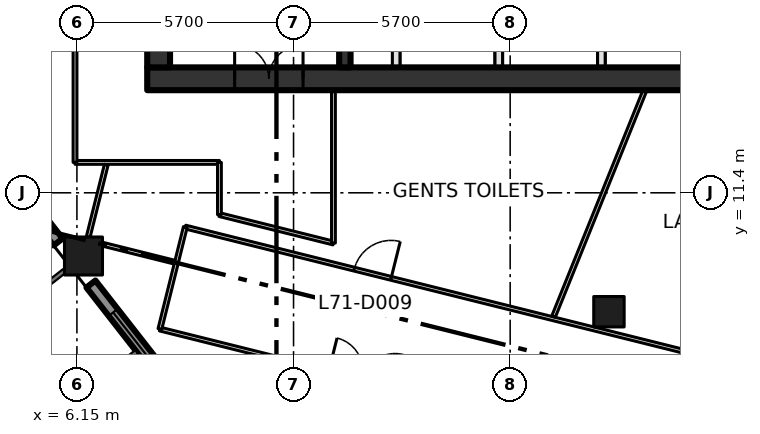
"""IFC4 building model, lengths in metres.
Left out: names, types, materials, properties, quantities, classifications, styles, units other than length and angle.
Written with IfcOpenShell. Run it as: python <this file> out.ifc"""

import sys

from ifc_helpers import new_model, si_unit, direction, frame, frame_2d, origin, origin_2d, place, context, subcontext, project, spatial, rectangle, extrude, element, fill, save


model = new_model("IFC4")
c1 = context("Model", 3, precision=1e-05, world=origin(), true_north=direction((0.0, 1.0)))
c2 = subcontext(c1, "Body", "Model", "MODEL_VIEW")
j1 = project(units=[si_unit("LENGTHUNIT", "METRE"), si_unit("PLANEANGLEUNIT", "RADIAN")], contexts=[c1])
p1 = place(None, origin())
s1 = spatial("IfcSite", under=j1, at=p1, CompositionType="ELEMENT")
p2 = place(p1, origin())
s2 = spatial("IfcBuilding", under=s1, at=p2, CompositionType="ELEMENT")
p3 = place(p2, frame((0.0, 0.0, 310.8)))
s3 = spatial("IfcBuildingStorey", under=s2, at=p3, CompositionType="ELEMENT", Elevation=310.8)
p4 = place(p3, frame((6.323, 9.737, 0.0), z_axis=(0.0, 0.0, 1.0), x_axis=(1.0, 0.0, 0.0)))
e1 = element("IfcColumn", 1, at=p4, inside=s3, PredefinedType="COLUMN", context=c2, shape_type="SweptSolid", body=[
    extrude(rectangle(XDim=1.0, YDim=1.0, at=origin_2d()), origin(), (0.0, 0.0, 1.0), 4.2),
])
p5 = place(p3, frame((20.149, 8.271, 0.0), z_axis=(0.0, 0.0, 1.0), x_axis=(1.0, 0.0, 0.0)))
e2 = element("IfcColumn", 2, at=p5, inside=s3, PredefinedType="COLUMN", context=c2, shape_type="SweptSolid", body=[
    extrude(rectangle(XDim=0.8, YDim=0.8, at=origin_2d()), origin(), (0.0, 0.0, 1.0), 4.2),
])
p6 = place(p3, frame((8.0, 14.4, -0.3), z_axis=(0.0, 0.0, 1.0), x_axis=(1.0, 0.0, 0.0)))
e3 = element("IfcWall", 3, at=p6, inside=s3, PredefinedType="SHEAR", context=c2, shape_type="SweptSolid", body=[
    extrude(rectangle(XDim=22.8, YDim=0.6, at=frame_2d((11.4, 0.0))), origin(), (0.0, 0.0, 1.0), 4.2),
])
p7 = place(p6, frame((2.3, 0.0, 0.3)))
e4 = element("IfcOpeningElement", 4, at=p7, cuts=e3, PredefinedType="OPENING", context=c2, shape_type="SweptSolid", body=[
    extrude(rectangle(XDim=1.8, YDim=2.1, at=frame_2d((0.9, 1.05))), frame((0.0, 0.31, 0.0), z_axis=(0.0, -1.0, 0.0), x_axis=(1.0, 0.0, 0.0)), (0.0, 0.0, 1.0), 0.62),
])
p8 = place(p3, frame((8.3, 14.7, -0.3), z_axis=(0.0, 0.0, 1.0), x_axis=(0.0, 1.0, 0.0)))
e5 = element("IfcWall", 5, at=p8, inside=s3, PredefinedType="SHEAR", context=c2, shape_type="SweptSolid", body=[
    extrude(rectangle(XDim=21.0, YDim=0.6, at=frame_2d((10.5, 0.0))), origin(), (0.0, 0.0, 1.0), 4.2),
])
p9 = place(p3, frame((13.2, 14.7, 0.0), z_axis=(0.0, 0.0, 1.0), x_axis=(0.0, 1.0, 0.0)))
e6 = element("IfcWall", 6, at=p9, inside=s3, PredefinedType="SHEAR", context=c2, shape_type="SweptSolid", body=[
    extrude(rectangle(XDim=21.0, YDim=0.3, at=frame_2d((10.5, 0.0))), origin(), (0.0, 0.0, 1.0), 3.9),
])
p10 = place(p9, frame((3.6, 0.0, 0.0)))
e7 = element("IfcOpeningElement", 7, at=p10, cuts=e6, PredefinedType="OPENING", context=c2, shape_type="SweptSolid", body=[
    extrude(rectangle(XDim=1.8, YDim=2.1, at=frame_2d((0.9, 1.05))), frame((0.0, 0.16, 0.0), z_axis=(0.0, -1.0, 0.0), x_axis=(1.0, 0.0, 0.0)), (0.0, 0.0, 1.0), 0.32),
])
p11 = place(p9, frame((11.7, 0.0, 0.0)))
e8 = element("IfcOpeningElement", 8, at=p11, cuts=e6, PredefinedType="OPENING", context=c2, shape_type="SweptSolid", body=[
    extrude(rectangle(XDim=1.2, YDim=2.1, at=frame_2d((0.6, 1.05))), frame((0.0, 0.16, 0.0), z_axis=(0.0, -1.0, 0.0), x_axis=(1.0, 0.0, 0.0)), (0.0, 0.0, 1.0), 0.32),
])
for number, where, z_axis, x_axis in (
    (9, (14.55, 14.7, 0.0), (0.0, 0.0, 1.0), (0.0, 1.0, 0.0)),
    (10, (17.25, 14.7, 0.0), (0.0, 0.0, 1.0), (0.0, 1.0, 0.0)),
    (11, (19.95, 14.7, 0.0), (0.0, 0.0, 1.0), (0.0, 1.0, 0.0)),
):
    element("IfcWall", number, at=place(p3, frame(where, z_axis=z_axis, x_axis=x_axis)), inside=s3, PredefinedType="SOLIDWALL", context=c2, shape_type="SweptSolid", body=[
        extrude(rectangle(XDim=2.9, YDim=0.2, at=frame_2d((1.45, 0.0))), origin(), (0.0, 0.0, 1.0), 3.9),
    ])
p12 = place(p3, frame((3.01, 13.491, 0.0), z_axis=(0.0, 0.0, 1.0), x_axis=(0.615713519567, -0.787970089421, 0.0)))
e12 = element("IfcWall", 12, at=p12, inside=s3, PredefinedType="SOLIDWALL", context=c2, shape_type="SweptSolid", body=[
    extrude(rectangle(XDim=4.296, YDim=0.3, at=frame_2d((2.148, 0.0))), origin(), (0.0, 0.0, 1.0), 3.2),
])
p13 = place(p12, frame((0.948, 0.0, 0.8)))
e13 = element("IfcOpeningElement", 13, at=p13, cuts=e12, PredefinedType="OPENING", context=c2, shape_type="SweptSolid", body=[
    extrude(rectangle(XDim=2.4, YDim=2.1, at=frame_2d((1.2, 1.05))), frame((0.0, 0.16, 0.0), z_axis=(0.0, -1.0, 0.0), x_axis=(1.0, 0.0, 0.0)), (0.0, 0.0, 1.0), 0.32),
])
p14 = place(p3, frame((6.519, 9.0, 0.0), z_axis=(0.0, 0.0, 1.0), x_axis=(0.615634121154, -0.788032124263, 0.0)))
e14 = element("IfcWall", 14, at=p14, inside=s3, PredefinedType="SOLIDWALL", context=c2, shape_type="SweptSolid", body=[
    extrude(rectangle(XDim=4.298, YDim=0.3, at=frame_2d((2.149, 0.0))), origin(), (0.0, 0.0, 1.0), 3.2),
])
p15 = place(p14, frame((0.949, 0.0, 0.8)))
e15 = element("IfcOpeningElement", 15, at=p15, cuts=e14, PredefinedType="OPENING", context=c2, shape_type="SweptSolid", body=[
    extrude(rectangle(XDim=2.4, YDim=2.1, at=frame_2d((1.2, 1.05))), frame((0.0, 0.16, 0.0), z_axis=(0.0, -1.0, 0.0), x_axis=(1.0, 0.0, 0.0)), (0.0, 0.0, 1.0), 0.32),
])
p16 = place(p3, frame((6.1, 12.2, 0.0), z_axis=(0.0, 0.0, 1.0), x_axis=(1.0, 0.0, 0.0)))
e16 = element("IfcWall", 16, at=p16, inside=s3, PredefinedType="PARTITIONING", context=c2, shape_type="SweptSolid", body=[
    extrude(rectangle(XDim=3.8, YDim=0.1, at=frame_2d((1.9, 0.0))), origin(), (0.0, 0.0, 1.0), 3.9),
])
p17 = place(p3, frame((6.1, 38.9, 0.0), z_axis=(0.0, 0.0, 1.0), x_axis=(0.0, -1.0, 0.0)))
e17 = element("IfcWall", 17, at=p17, inside=s3, PredefinedType="PARTITIONING", context=c2, shape_type="SweptSolid", body=[
    extrude(rectangle(XDim=26.7, YDim=0.1, at=frame_2d((13.35, 0.0))), origin(), (0.0, 0.0, 1.0), 3.9),
])
p18 = place(p17, frame((20.636, 0.0, 0.0)))
e18 = element("IfcOpeningElement", 18, at=p18, cuts=e17, PredefinedType="OPENING", context=c2, shape_type="SweptSolid", body=[
    extrude(rectangle(XDim=1.0, YDim=2.1, at=frame_2d((0.5, 1.05))), frame((0.0, 0.06, 0.0), z_axis=(0.0, -1.0, 0.0), x_axis=(1.0, 0.0, 0.0)), (0.0, 0.0, 1.0), 0.12),
])
p19 = place(p17, frame((6.88, 0.0, 0.0)))
e19 = element("IfcOpeningElement", 19, at=p19, cuts=e17, PredefinedType="OPENING", context=c2, shape_type="SweptSolid", body=[
    extrude(rectangle(XDim=1.8, YDim=2.1, at=frame_2d((0.9, 1.05))), frame((0.0, 0.06, 0.0), z_axis=(0.0, -1.0, 0.0), x_axis=(1.0, 0.0, 0.0)), (0.0, 0.0, 1.0), 0.12),
])
p20 = place(p3, frame((8.333, 7.815, 0.0), z_axis=(0.0, 0.0, 1.0), x_axis=(0.970306508913, -0.241878644697, 0.0)))
e20 = element("IfcWall", 20, at=p20, inside=s3, PredefinedType="PARTITIONING", context=c2, shape_type="SweptSolid", body=[
    extrude(rectangle(XDim=11.018, YDim=0.1, at=frame_2d((5.509, 0.0))), origin(), (0.0, 0.0, 1.0), 3.9),
])
p21 = place(p20, frame((4.58, 0.0, 0.0)))
e21 = element("IfcOpeningElement", 21, at=p21, cuts=e20, PredefinedType="OPENING", context=c2, shape_type="SweptSolid", body=[
    extrude(rectangle(XDim=1.8, YDim=2.1, at=frame_2d((0.9, 1.05))), frame((0.0, 0.06, 0.0), z_axis=(0.0, -1.0, 0.0), x_axis=(1.0, 0.0, 0.0)), (0.0, 0.0, 1.0), 0.12),
])
p22 = place(p3, frame((9.002, 10.499, 0.0), z_axis=(0.0, 0.0, 1.0), x_axis=(0.970298340477, -0.241911410372, 0.0)))
e22 = element("IfcWall", 22, at=p22, inside=s3, PredefinedType="PARTITIONING", context=c2, shape_type="SweptSolid", body=[
    extrude(rectangle(XDim=19.88, YDim=0.1, at=frame_2d((9.94, 0.0))), origin(), (0.0, 0.0, 1.0), 3.9),
])
p23 = place(p22, frame((4.58, 0.0, 0.0)))
e23 = element("IfcOpeningElement", 23, at=p23, cuts=e22, PredefinedType="OPENING", context=c2, shape_type="SweptSolid", body=[
    extrude(rectangle(XDim=1.0, YDim=2.1, at=frame_2d((0.5, 1.05))), frame((0.0, 0.06, 0.0), z_axis=(0.0, -1.0, 0.0), x_axis=(1.0, 0.0, 0.0)), (0.0, 0.0, 1.0), 0.12),
])
p24 = place(p22, frame((14.343, 0.0, 0.0)))
e24 = element("IfcOpeningElement", 24, at=p24, cuts=e22, PredefinedType="OPENING", context=c2, shape_type="SweptSolid", body=[
    extrude(rectangle(XDim=1.0, YDim=2.1, at=frame_2d((0.5, 1.05))), frame((0.0, 0.06, 0.0), z_axis=(0.0, -1.0, 0.0), x_axis=(1.0, 0.0, 0.0)), (0.0, 0.0, 1.0), 0.12),
])
p25 = place(p3, frame((9.002, 10.499, 0.0), z_axis=(0.0, 0.0, 1.0), x_axis=(-0.2418294893, -0.970318761081, 0.0)))
e25 = element("IfcWall", 25, at=p25, inside=s3, PredefinedType="PARTITIONING", context=c2, shape_type="SweptSolid", body=[
    extrude(rectangle(XDim=2.766, YDim=0.1, at=frame_2d((1.383, 0.0))), origin(), (0.0, 0.0, 1.0), 3.9),
])
p26 = place(p3, frame((9.9, 10.826, 0.0), z_axis=(0.0, 0.0, 1.0), x_axis=(0.970290953223, -0.241941038466, 0.0)))
e26 = element("IfcWall", 26, at=p26, inside=s3, PredefinedType="PARTITIONING", context=c2, shape_type="SweptSolid", body=[
    extrude(rectangle(XDim=3.092, YDim=0.1, at=frame_2d((1.546, 0.0))), origin(), (0.0, 0.0, 1.0), 3.9),
])
p27 = place(p3, frame((9.9, 12.2, 0.0), z_axis=(0.0, 0.0, 1.0), x_axis=(0.0, -1.0, 0.0)))
e27 = element("IfcWall", 27, at=p27, inside=s3, PredefinedType="PARTITIONING", context=c2, shape_type="SweptSolid", body=[
    extrude(rectangle(XDim=1.374, YDim=0.1, at=frame_2d((0.687, 0.0))), origin(), (0.0, 0.0, 1.0), 3.9),
])
p28 = place(p3, frame((12.9, 10.078, 0.0), z_axis=(0.0, 0.0, 1.0), x_axis=(0.0, 1.0, 0.0)))
e28 = element("IfcWall", 28, at=p28, inside=s3, PredefinedType="PARTITIONING", context=c2, shape_type="SweptSolid", body=[
    extrude(rectangle(XDim=4.022, YDim=0.1, at=frame_2d((2.011, 0.0))), origin(), (0.0, 0.0, 1.0), 3.9),
])
p29 = place(p3, frame((6.922, 12.138, 0.0), z_axis=(0.0, 0.0, 1.0), x_axis=(-0.242476987996, -0.970157157523, 0.0)))
e29 = element("IfcWall", 29, at=p29, inside=s3, PredefinedType="PARTITIONING", context=c2, shape_type="SweptSolid", body=[
    extrude(rectangle(XDim=1.959, YDim=0.1, at=frame_2d((0.98, 0.0))), origin(), (0.0, 0.0, 1.0), 3.9),
])
p30 = place(p3, frame((8.72, 9.575, 0.0), z_axis=(0.0, 0.0, 1.0), x_axis=(-0.970274576003, 0.242006708918, 0.0)))
e30 = element("IfcWall", 30, at=p30, inside=s3, PredefinedType="PARTITIONING", context=c2, shape_type="SweptSolid", body=[
    extrude(rectangle(XDim=1.955, YDim=0.1, at=frame_2d((0.978, 0.0))), origin(), (0.0, 0.0, 1.0), 3.9),
])
p31 = place(p3, frame((18.691, 8.142, 0.0), z_axis=(0.0, 0.0, 1.0), x_axis=(0.374447972071, 0.927247925968, 0.0)))
e31 = element("IfcWall", 31, at=p31, inside=s3, PredefinedType="PARTITIONING", context=c2, shape_type="SweptSolid", body=[
    extrude(rectangle(XDim=6.426, YDim=0.1, at=frame_2d((3.213, 0.0))), origin(), (0.0, 0.0, 1.0), 3.9),
])
p32 = place(p7, origin())
e32 = element("IfcDoor", 32, at=p32, inside=s3, OperationType="DOUBLE_DOOR_SINGLE_SWING", PredefinedType="DOOR", context=c2, shape_type="SweptSolid", body=[
    extrude(rectangle(XDim=1.8, YDim=2.1, at=frame_2d((0.9, 1.05))), frame((0.0, 0.025, 0.0), z_axis=(0.0, -1.0, 0.0), x_axis=(1.0, 0.0, 0.0)), (0.0, 0.0, 1.0), 0.05),
])
fill(e4, e32)
p33 = place(p15, origin())
e33 = element("IfcWindow", 33, at=p33, inside=s3, PartitioningType="DOUBLE_PANEL_VERTICAL", PredefinedType="WINDOW", context=c2, shape_type="SweptSolid", body=[
    extrude(rectangle(XDim=2.4, YDim=2.1, at=frame_2d((1.2, 1.05))), frame((0.0, 0.03, 0.0), z_axis=(0.0, -1.0, 0.0), x_axis=(1.0, 0.0, 0.0)), (0.0, 0.0, 1.0), 0.06),
])
fill(e15, e33)
p34 = place(p23, origin())
e34 = element("IfcDoor", 34, at=p34, inside=s3, OperationType="SINGLE_SWING_RIGHT", PredefinedType="DOOR", context=c2, shape_type="SweptSolid", body=[
    extrude(rectangle(XDim=1.0, YDim=2.1, at=frame_2d((0.5, 1.05))), frame((0.0, 0.025, 0.0), z_axis=(0.0, -1.0, 0.0), x_axis=(1.0, 0.0, 0.0)), (0.0, 0.0, 1.0), 0.05),
])
fill(e23, e34)
save(model, sys.argv[1])
